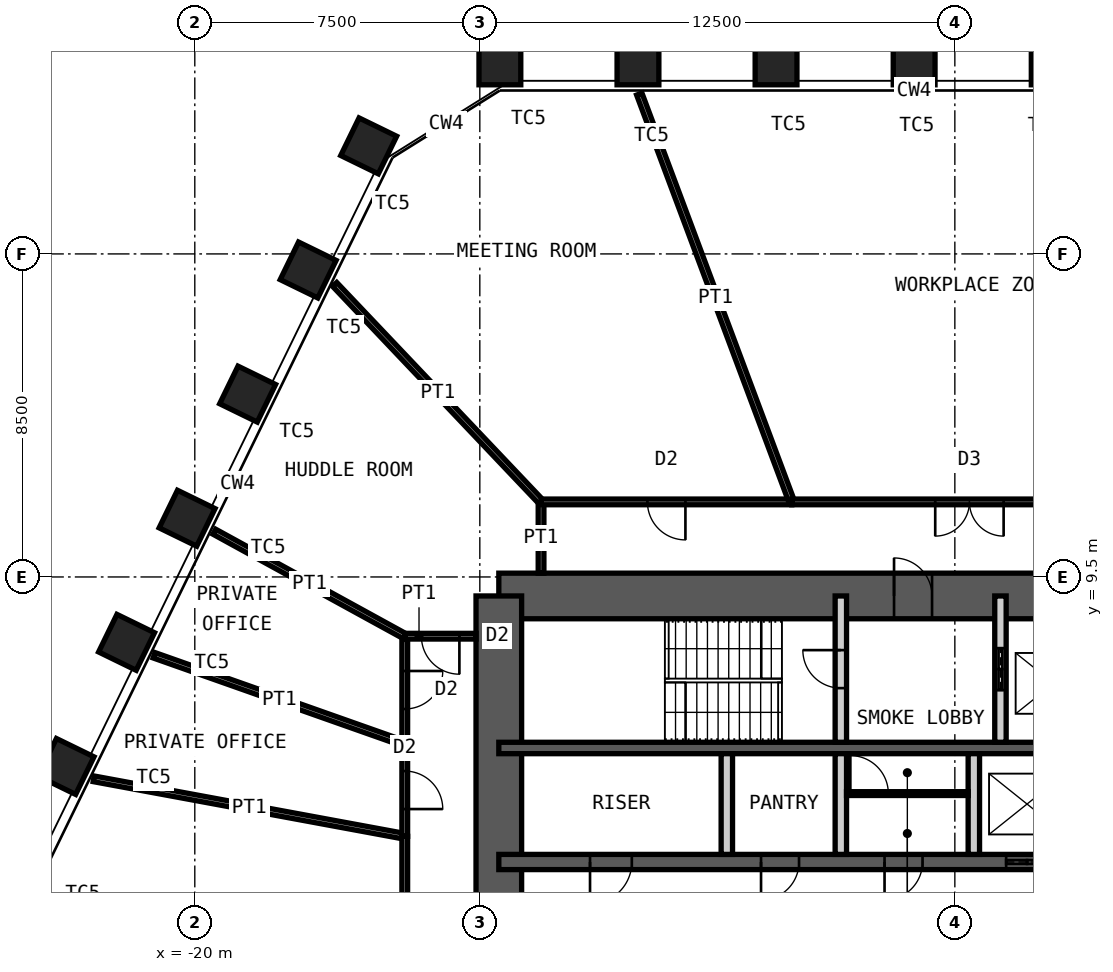
"""IFC4 building model, lengths in metres.
Left out: names, types, materials, properties, quantities, classifications, styles, units other than length and angle.
Written with IfcOpenShell. Run it as: python <this file> out.ifc"""

import sys

from ifc_helpers import new_model, si_unit, direction, frame, frame_2d, origin, origin_2d, place, context, subcontext, project, spatial, rectangle, hollow_rectangle, extrude, element, fill, save


model = new_model("IFC4")
c1 = context("Model", 3, precision=1e-05, world=origin(), true_north=direction((0.0, 1.0)))
c2 = subcontext(c1, "Body", "Model", "MODEL_VIEW")
j1 = project(units=[si_unit("LENGTHUNIT", "METRE"), si_unit("PLANEANGLEUNIT", "RADIAN")], contexts=[c1])
p1 = place(None, origin())
s1 = spatial("IfcSite", under=j1, at=p1, CompositionType="ELEMENT")
p2 = place(p1, origin())
s2 = spatial("IfcBuilding", under=s1, at=p2, CompositionType="ELEMENT")
p3 = place(p2, frame((0.0, 0.0, 193.0)))
s3 = spatial("IfcBuildingStorey", under=s2, at=p3, CompositionType="ELEMENT", Elevation=193.0)
for number, where, z_axis, x_axis in (
    (1, (-11.972, 23.0, 0.0), (0.0, 0.0, 1.0), (-1.0, 0.0, 0.0)),
    (2, (-8.338, 23.0, 0.0), (0.0, 0.0, 1.0), (-1.0, 0.0, 0.0)),
    (3, (-4.705, 23.0, 0.0), (0.0, 0.0, 1.0), (-1.0, 0.0, 0.0)),
    (4, (-1.071, 23.0, 0.0), (0.0, 0.0, 1.0), (-1.0, 0.0, 0.0)),
    (5, (2.562, 23.0, 0.0), (0.0, 0.0, 1.0), (-1.0, 0.0, 0.0)),
    (6, (-23.388, 4.514, 0.0), (0.0, 0.0, 1.0), (-0.438, -0.899, 0.0)),
    (7, (-21.795, 7.78, 0.0), (0.0, 0.0, 1.0), (-0.438, -0.899, 0.0)),
    (8, (-20.203, 11.045, 0.0), (0.0, 0.0, 1.0), (-0.438, -0.899, 0.0)),
    (9, (-18.61, 14.311, 0.0), (0.0, 0.0, 1.0), (-0.438, -0.899, 0.0)),
    (10, (-17.017, 17.577, 0.0), (0.0, 0.0, 1.0), (-0.438, -0.899, 0.0)),
    (11, (-15.424, 20.843, 0.0), (0.0, 0.0, 1.0), (-0.438, -0.899, 0.0)),
):
    element("IfcColumn", number, at=place(p3, frame(where, z_axis=z_axis, x_axis=x_axis)), inside=s3, PredefinedType="COLUMN", context=c2, shape_type="SweptSolid", body=[
        extrude(hollow_rectangle(XDim=1.1, YDim=1.1, WallThickness=0.07, at=origin_2d()), origin(), (0.0, 0.0, 1.0), 4.2),
    ])
p4 = place(p3, frame((-12.0, 9.0, 0.0), z_axis=(0.0, 0.0, 1.0), x_axis=(1.0, 0.0, 0.0)))
e12 = element("IfcWall", 12, at=p4, inside=s3, PredefinedType="SHEAR", context=c2, shape_type="SweptSolid", body=[
    extrude(rectangle(XDim=24.0, YDim=1.2, at=frame_2d((12.0, 0.0))), origin(), (0.0, 0.0, 1.0), 4.2),
])
p5 = place(p4, frame((10.4, 0.0, 0.0)))
e13 = element("IfcOpeningElement", 13, at=p5, cuts=e12, PredefinedType="OPENING", context=c2, shape_type="SweptSolid", body=[
    extrude(rectangle(XDim=1.0, YDim=2.1, at=frame_2d((0.5, 1.05))), frame((0.0, 0.61, 0.0), z_axis=(0.0, -1.0, 0.0), x_axis=(1.0, 0.0, 0.0)), (0.0, 0.0, 1.0), 1.22),
])
p6 = place(p4, frame((17.6, 0.0, 0.0)))
e14 = element("IfcOpeningElement", 14, at=p6, cuts=e12, PredefinedType="OPENING", context=c2, shape_type="SweptSolid", body=[
    extrude(rectangle(XDim=0.9, YDim=2.1, at=frame_2d((0.45, 1.05))), frame((0.0, 0.61, 0.0), z_axis=(0.0, -1.0, 0.0), x_axis=(1.0, 0.0, 0.0)), (0.0, 0.0, 1.0), 1.22),
])
p7 = place(p4, frame((21.9, 0.0, 0.0)))
e15 = element("IfcOpeningElement", 15, at=p7, cuts=e12, PredefinedType="OPENING", context=c2, shape_type="SweptSolid", body=[
    extrude(rectangle(XDim=0.9, YDim=2.1, at=frame_2d((0.45, 1.05))), frame((0.0, 0.61, 0.0), z_axis=(0.0, -1.0, 0.0), x_axis=(1.0, 0.0, 0.0)), (0.0, 0.0, 1.0), 1.22),
])
p8 = place(p3, frame((-12.0, -9.0, 0.0), z_axis=(0.0, 0.0, 1.0), x_axis=(0.0, 1.0, 0.0)))
e16 = element("IfcWall", 16, at=p8, inside=s3, PredefinedType="SHEAR", context=c2, shape_type="SweptSolid", body=[
    extrude(rectangle(XDim=18.0, YDim=1.2, at=frame_2d((9.0, 0.0))), origin(), (0.0, 0.0, 1.0), 4.2),
])
p9 = place(p8, frame((8.1, 0.0, 0.0)))
e17 = element("IfcOpeningElement", 17, at=p9, cuts=e16, PredefinedType="OPENING", context=c2, shape_type="SweptSolid", body=[
    extrude(rectangle(XDim=1.8, YDim=2.1, at=frame_2d((0.9, 1.05))), frame((0.0, 0.61, 0.0), z_axis=(0.0, -1.0, 0.0), x_axis=(1.0, 0.0, 0.0)), (0.0, 0.0, 1.0), 1.22),
])
p10 = place(p3, frame((-12.0, 5.0, 0.0), z_axis=(0.0, 0.0, 1.0), x_axis=(1.0, 0.0, 0.0)))
e18 = element("IfcWall", 18, at=p10, inside=s3, PredefinedType="SHEAR", context=c2, shape_type="SweptSolid", body=[
    extrude(rectangle(XDim=24.0, YDim=0.3, at=frame_2d((12.0, 0.0))), origin(), (0.0, 0.0, 1.0), 4.2),
])
p11 = place(p3, frame((-12.0, 2.0, 0.0), z_axis=(0.0, 0.0, 1.0), x_axis=(1.0, 0.0, 0.0)))
e19 = element("IfcWall", 19, at=p11, inside=s3, PredefinedType="SHEAR", context=c2, shape_type="SweptSolid", body=[
    extrude(rectangle(XDim=24.0, YDim=0.4, at=frame_2d((12.0, 0.0))), origin(), (0.0, 0.0, 1.0), 4.2),
])
p12 = place(p11, frame((2.4, 0.0, 0.0)))
e20 = element("IfcOpeningElement", 20, at=p12, cuts=e19, PredefinedType="OPENING", context=c2, shape_type="SweptSolid", body=[
    extrude(rectangle(XDim=1.1, YDim=2.1, at=frame_2d((0.55, 1.05))), frame((0.0, 0.21, 0.0), z_axis=(0.0, -1.0, 0.0), x_axis=(1.0, 0.0, 0.0)), (0.0, 0.0, 1.0), 0.42),
])
p13 = place(p11, frame((22.0, 0.0, 0.0)))
e21 = element("IfcOpeningElement", 21, at=p13, cuts=e19, PredefinedType="OPENING", context=c2, shape_type="SweptSolid", body=[
    extrude(rectangle(XDim=1.1, YDim=2.1, at=frame_2d((0.55, 1.05))), frame((0.0, 0.21, 0.0), z_axis=(0.0, -1.0, 0.0), x_axis=(1.0, 0.0, 0.0)), (0.0, 0.0, 1.0), 0.42),
])
p14 = place(p11, frame((10.15, 0.0, 0.0)))
e22 = element("IfcOpeningElement", 22, at=p14, cuts=e19, PredefinedType="OPENING", context=c2, shape_type="SweptSolid", body=[
    extrude(rectangle(XDim=1.0, YDim=2.1, at=frame_2d((0.5, 1.05))), frame((0.0, 0.21, 0.0), z_axis=(0.0, -1.0, 0.0), x_axis=(1.0, 0.0, 0.0)), (0.0, 0.0, 1.0), 0.42),
])
p15 = place(p11, frame((6.9, 0.0, 0.0)))
e23 = element("IfcOpeningElement", 23, at=p15, cuts=e19, PredefinedType="OPENING", context=c2, shape_type="SweptSolid", body=[
    extrude(rectangle(XDim=1.0, YDim=2.1, at=frame_2d((0.5, 1.05))), frame((0.0, 0.21, 0.0), z_axis=(0.0, -1.0, 0.0), x_axis=(1.0, 0.0, 0.0)), (0.0, 0.0, 1.0), 0.42),
])
p16 = place(p11, frame((13.35, 0.0, 0.0)))
e24 = element("IfcOpeningElement", 24, at=p16, cuts=e19, PredefinedType="OPENING", context=c2, shape_type="SweptSolid", body=[
    extrude(rectangle(XDim=1.1, YDim=2.4, at=frame_2d((0.55, 1.2))), frame((0.0, 0.21, 0.0), z_axis=(0.0, -1.0, 0.0), x_axis=(1.0, 0.0, 0.0)), (0.0, 0.0, 1.0), 0.42),
])
p17 = place(p11, frame((16.15, 0.0, 0.0)))
e25 = element("IfcOpeningElement", 25, at=p17, cuts=e19, PredefinedType="OPENING", context=c2, shape_type="SweptSolid", body=[
    extrude(rectangle(XDim=1.1, YDim=2.4, at=frame_2d((0.55, 1.2))), frame((0.0, 0.21, 0.0), z_axis=(0.0, -1.0, 0.0), x_axis=(1.0, 0.0, 0.0)), (0.0, 0.0, 1.0), 0.42),
])
p18 = place(p11, frame((18.95, 0.0, 0.0)))
e26 = element("IfcOpeningElement", 26, at=p18, cuts=e19, PredefinedType="OPENING", context=c2, shape_type="SweptSolid", body=[
    extrude(rectangle(XDim=1.1, YDim=2.4, at=frame_2d((0.55, 1.2))), frame((0.0, 0.21, 0.0), z_axis=(0.0, -1.0, 0.0), x_axis=(1.0, 0.0, 0.0)), (0.0, 0.0, 1.0), 0.42),
])
p19 = place(p3, frame((-3.0, 5.15, 0.0), z_axis=(0.0, 0.0, 1.0), x_axis=(0.0, 1.0, 0.0)))
e27 = element("IfcWall", 27, at=p19, inside=s3, PredefinedType="PARTITIONING", context=c2, shape_type="SweptSolid", body=[
    extrude(rectangle(XDim=3.85, YDim=0.3, at=frame_2d((1.925, 0.0))), origin(), (0.0, 0.0, 1.0), 3.98),
])
p20 = place(p19, frame((1.425, 0.0, 0.0)))
e28 = element("IfcOpeningElement", 28, at=p20, cuts=e27, PredefinedType="OPENING", context=c2, shape_type="SweptSolid", body=[
    extrude(rectangle(XDim=1.0, YDim=2.1, at=frame_2d((0.5, 1.05))), frame((0.0, 0.16, 0.0), z_axis=(0.0, -1.0, 0.0), x_axis=(1.0, 0.0, 0.0)), (0.0, 0.0, 1.0), 0.32),
])
p21 = place(p3, frame((1.2, 5.15, 0.0), z_axis=(0.0, 0.0, 1.0), x_axis=(0.0, 1.0, 0.0)))
e29 = element("IfcWall", 29, at=p21, inside=s3, PredefinedType="PARTITIONING", context=c2, shape_type="SweptSolid", body=[
    extrude(rectangle(XDim=3.85, YDim=0.3, at=frame_2d((1.925, 0.0))), origin(), (0.0, 0.0, 1.0), 3.98),
])
p22 = place(p21, frame((1.375, 0.0, 0.0)))
e30 = element("IfcOpeningElement", 30, at=p22, cuts=e29, PredefinedType="OPENING", context=c2, shape_type="SweptSolid", body=[
    extrude(rectangle(XDim=1.1, YDim=2.4, at=frame_2d((0.55, 1.2))), frame((0.0, 0.16, 0.0), z_axis=(0.0, -1.0, 0.0), x_axis=(1.0, 0.0, 0.0)), (0.0, 0.0, 1.0), 0.32),
])
for number, where, z_axis, x_axis in (
    (31, (-6.0, 2.2, 0.0), (0.0, 0.0, 1.0), (0.0, 1.0, 0.0)),
    (32, (-3.0, 2.2, 0.0), (0.0, 0.0, 1.0), (0.0, 1.0, 0.0)),
    (33, (0.5, 2.2, 0.0), (0.0, 0.0, 1.0), (0.0, 1.0, 0.0)),
):
    element("IfcWall", number, at=place(p3, frame(where, z_axis=z_axis, x_axis=x_axis)), inside=s3, PredefinedType="PARTITIONING", context=c2, shape_type="SweptSolid", body=[
        extrude(rectangle(XDim=2.65, YDim=0.3, at=frame_2d((1.325, 0.0))), origin(), (0.0, 0.0, 1.0), 3.98),
    ])
p23 = place(p3, frame((-2.85, 3.8, 0.0), z_axis=(0.0, 0.0, 1.0), x_axis=(1.0, 0.0, 0.0)))
e34 = element("IfcWall", 34, at=p23, inside=s3, PredefinedType="PARTITIONING", context=c2, shape_type="SweptSolid", body=[
    extrude(rectangle(XDim=3.2, YDim=0.1, at=frame_2d((1.6, 0.0))), origin(), (0.0, 0.0, 1.0), 3.98),
])
p24 = place(p23, frame((0.1, 0.0, 0.0)))
e35 = element("IfcOpeningElement", 35, at=p24, cuts=e34, PredefinedType="OPENING", context=c2, shape_type="SweptSolid", body=[
    extrude(rectangle(XDim=1.0, YDim=2.4, at=frame_2d((0.5, 1.2))), frame((0.0, 0.06, 0.0), z_axis=(0.0, -1.0, 0.0), x_axis=(1.0, 0.0, 0.0)), (0.0, 0.0, 1.0), 0.12),
])
p25 = place(p3, frame((-22.661, 4.189, 0.0), z_axis=(0.0, 0.0, 1.0), x_axis=(0.983345347199, -0.181746879316, 0.0)))
e36 = element("IfcWall", 36, at=p25, inside=s3, PredefinedType="PARTITIONING", context=c2, shape_type="SweptSolid", body=[
    extrude(rectangle(XDim=8.324, YDim=0.15, at=frame_2d((4.162, 0.0))), origin(), (0.0, 0.0, 1.0), 3.43),
])
p26 = place(p3, frame((-14.475, 2.676, 0.0), z_axis=(0.0, 0.0, 1.0), x_axis=(0.0, 1.0, 0.0)))
e37 = element("IfcWall", 37, at=p26, inside=s3, PredefinedType="PARTITIONING", context=c2, shape_type="SweptSolid", body=[
    extrude(rectangle(XDim=2.435, YDim=0.15, at=frame_2d((1.217, 0.0))), origin(), (0.0, 0.0, 1.0), 4.03),
])
p27 = place(p26, frame((0.717, 0.0, 0.0)))
e38 = element("IfcOpeningElement", 38, at=p27, cuts=e37, PredefinedType="OPENING", context=c2, shape_type="SweptSolid", body=[
    extrude(rectangle(XDim=1.0, YDim=2.4, at=frame_2d((0.5, 1.2))), frame((0.0, 0.085, 0.0), z_axis=(0.0, -1.0, 0.0), x_axis=(1.0, 0.0, 0.0)), (0.0, 0.0, 1.0), 0.17),
])
p28 = place(p3, frame((-21.072, 7.439, 0.0), z_axis=(0.0, 0.0, 1.0), x_axis=(0.94295553867, -0.332918686907, 0.0)))
e39 = element("IfcWall", 39, at=p28, inside=s3, PredefinedType="PARTITIONING", context=c2, shape_type="SweptSolid", body=[
    extrude(rectangle(XDim=6.996, YDim=0.15, at=frame_2d((3.498, 0.0))), origin(), (0.0, 0.0, 1.0), 3.43),
])
p29 = place(p3, frame((-14.475, 5.11, 0.0), z_axis=(0.0, 0.0, 1.0), x_axis=(0.0, 1.0, 0.0)))
e40 = element("IfcWall", 40, at=p29, inside=s3, PredefinedType="PARTITIONING", context=c2, shape_type="SweptSolid", body=[
    extrude(rectangle(XDim=2.831, YDim=0.15, at=frame_2d((1.416, 0.0))), origin(), (0.0, 0.0, 1.0), 4.03),
])
p30 = place(p29, frame((0.916, 0.0, 0.0)))
e41 = element("IfcOpeningElement", 41, at=p30, cuts=e40, PredefinedType="OPENING", context=c2, shape_type="SweptSolid", body=[
    extrude(rectangle(XDim=1.0, YDim=2.4, at=frame_2d((0.5, 1.2))), frame((0.0, 0.085, 0.0), z_axis=(0.0, -1.0, 0.0), x_axis=(1.0, 0.0, 0.0)), (0.0, 0.0, 1.0), 0.17),
])
p31 = place(p3, frame((-19.486, 10.69, 0.0), z_axis=(0.0, 0.0, 1.0), x_axis=(0.876724089264, -0.480993629172, 0.0)))
e42 = element("IfcWall", 42, at=p31, inside=s3, PredefinedType="PARTITIONING", context=c2, shape_type="SweptSolid", body=[
    extrude(rectangle(XDim=5.715, YDim=0.15, at=frame_2d((2.858, 0.0))), origin(), (0.0, 0.0, 1.0), 3.43),
])
p32 = place(p3, frame((-14.475, 7.941, 0.0), z_axis=(0.0, 0.0, 1.0), x_axis=(1.0, 0.0, 0.0)))
e43 = element("IfcWall", 43, at=p32, inside=s3, PredefinedType="PARTITIONING", context=c2, shape_type="SweptSolid", body=[
    extrude(rectangle(XDim=1.875, YDim=0.15, at=frame_2d((0.938, 0.0))), origin(), (0.0, 0.0, 1.0), 4.03),
])
p33 = place(p32, frame((0.438, 0.0, 0.0)))
e44 = element("IfcOpeningElement", 44, at=p33, cuts=e43, PredefinedType="OPENING", context=c2, shape_type="SweptSolid", body=[
    extrude(rectangle(XDim=1.0, YDim=2.4, at=frame_2d((0.5, 1.2))), frame((0.0, 0.085, 0.0), z_axis=(0.0, -1.0, 0.0), x_axis=(1.0, 0.0, 0.0)), (0.0, 0.0, 1.0), 0.17),
])
p34 = place(p3, frame((-10.889, 9.6, 0.0), z_axis=(0.0, 0.0, 1.0), x_axis=(0.0, 1.0, 0.0)))
e45 = element("IfcWall", 45, at=p34, inside=s3, PredefinedType="PARTITIONING", context=c2, shape_type="SweptSolid", body=[
    extrude(rectangle(XDim=1.875, YDim=0.15, at=frame_2d((0.938, 0.0))), origin(), (0.0, 0.0, 1.0), 4.03),
])
p35 = place(p3, frame((-16.319, 17.198, 0.0), z_axis=(0.0, 0.0, 1.0), x_axis=(0.688326413955, -0.725401094466, 0.0)))
e46 = element("IfcWall", 46, at=p35, inside=s3, PredefinedType="PARTITIONING", context=c2, shape_type="SweptSolid", body=[
    extrude(rectangle(XDim=7.889, YDim=0.15, at=frame_2d((3.944, 0.0))), origin(), (0.0, 0.0, 1.0), 4.03),
])
p36 = place(p3, frame((-10.889, 11.475, 0.0), z_axis=(0.0, 0.0, 1.0), x_axis=(1.0, 0.0, 0.0)))
e47 = element("IfcWall", 47, at=p36, inside=s3, PredefinedType="PARTITIONING", context=c2, shape_type="SweptSolid", body=[
    extrude(rectangle(XDim=6.598, YDim=0.15, at=frame_2d((3.299, 0.0))), origin(), (0.0, 0.0, 1.0), 4.03),
])
p37 = place(p36, frame((2.799, 0.0, 0.0)))
e48 = element("IfcOpeningElement", 48, at=p37, cuts=e47, PredefinedType="OPENING", context=c2, shape_type="SweptSolid", body=[
    extrude(rectangle(XDim=1.0, YDim=2.4, at=frame_2d((0.5, 1.2))), frame((0.0, 0.085, 0.0), z_axis=(0.0, -1.0, 0.0), x_axis=(1.0, 0.0, 0.0)), (0.0, 0.0, 1.0), 0.17),
])
p38 = place(p3, frame((-8.303, 22.206, 0.0), z_axis=(0.0, 0.0, 1.0), x_axis=(0.350242883069, -0.936658914899, 0.0)))
e49 = element("IfcWall", 49, at=p38, inside=s3, PredefinedType="PARTITIONING", context=c2, shape_type="SweptSolid", body=[
    extrude(rectangle(XDim=11.457, YDim=0.15, at=frame_2d((5.729, 0.0))), origin(), (0.0, 0.0, 1.0), 3.43),
])
p39 = place(p3, frame((-4.291, 11.475, 0.0), z_axis=(0.0, 0.0, 1.0), x_axis=(1.0, 0.0, 0.0)))
e50 = element("IfcWall", 50, at=p39, inside=s3, PredefinedType="PARTITIONING", context=c2, shape_type="SweptSolid", body=[
    extrude(rectangle(XDim=9.349, YDim=0.15, at=frame_2d((4.674, 0.0))), origin(), (0.0, 0.0, 1.0), 4.03),
])
p40 = place(p39, frame((3.774, 0.0, 0.0)))
e51 = element("IfcOpeningElement", 51, at=p40, cuts=e50, PredefinedType="OPENING", context=c2, shape_type="SweptSolid", body=[
    extrude(rectangle(XDim=1.8, YDim=2.4, at=frame_2d((0.9, 1.2))), frame((0.0, 0.085, 0.0), z_axis=(0.0, -1.0, 0.0), x_axis=(1.0, 0.0, 0.0)), (0.0, 0.0, 1.0), 0.17),
])
p41 = place(p3, frame((-14.475, -9.311, 0.0), z_axis=(0.0, 0.0, 1.0), x_axis=(0.0, 1.0, 0.0)))
e52 = element("IfcWall", 52, at=p41, inside=s3, PredefinedType="PARTITIONING", context=c2, shape_type="SweptSolid", body=[
    extrude(rectangle(XDim=11.987, YDim=0.15, at=frame_2d((5.993, 0.0))), origin(), (0.0, 0.0, 1.0), 4.03),
])
p42 = place(p41, frame((5.093, 0.0, 0.0)))
e53 = element("IfcOpeningElement", 53, at=p42, cuts=e52, PredefinedType="OPENING", context=c2, shape_type="SweptSolid", body=[
    extrude(rectangle(XDim=1.8, YDim=2.4, at=frame_2d((0.9, 1.2))), frame((0.0, 0.085, 0.0), z_axis=(0.0, -1.0, 0.0), x_axis=(1.0, 0.0, 0.0)), (0.0, 0.0, 1.0), 0.17),
])
p43 = place(p5, origin())
e54 = element("IfcDoor", 54, at=p43, inside=s3, OperationType="SINGLE_SWING_RIGHT", PredefinedType="DOOR", context=c2, shape_type="SweptSolid", body=[
    extrude(rectangle(XDim=1.0, YDim=2.1, at=frame_2d((0.5, 1.05))), frame((0.0, 0.025, 0.0), z_axis=(0.0, -1.0, 0.0), x_axis=(1.0, 0.0, 0.0)), (0.0, 0.0, 1.0), 0.05),
])
fill(e13, e54)
p44 = place(p20, origin())
e55 = element("IfcDoor", 55, at=p44, inside=s3, OperationType="SINGLE_SWING_LEFT", PredefinedType="DOOR", context=c2, shape_type="SweptSolid", body=[
    extrude(rectangle(XDim=1.0, YDim=2.1, at=frame_2d((0.5, 1.05))), frame((0.0, 0.025, 0.0), z_axis=(0.0, -1.0, 0.0), x_axis=(1.0, 0.0, 0.0)), (0.0, 0.0, 1.0), 0.05),
])
fill(e28, e55)
p45 = place(p12, origin())
e56 = element("IfcDoor", 56, at=p45, inside=s3, OperationType="SINGLE_SWING_LEFT", PredefinedType="DOOR", context=c2, shape_type="SweptSolid", body=[
    extrude(rectangle(XDim=1.1, YDim=2.1, at=frame_2d((0.55, 1.05))), frame((0.0, 0.025, 0.0), z_axis=(0.0, -1.0, 0.0), x_axis=(1.0, 0.0, 0.0)), (0.0, 0.0, 1.0), 0.05),
])
fill(e20, e56)
p46 = place(p14, origin())
e57 = element("IfcDoor", 57, at=p46, inside=s3, OperationType="SINGLE_SWING_LEFT", PredefinedType="DOOR", context=c2, shape_type="SweptSolid", body=[
    extrude(rectangle(XDim=1.0, YDim=2.1, at=frame_2d((0.5, 1.05))), frame((0.0, 0.025, 0.0), z_axis=(0.0, -1.0, 0.0), x_axis=(1.0, 0.0, 0.0)), (0.0, 0.0, 1.0), 0.05),
])
fill(e22, e57)
p47 = place(p22, origin())
e58 = element("IfcDoor", 58, at=p47, inside=s3, OperationType="DOUBLE_DOOR_SLIDING", PredefinedType="DOOR", context=c2, shape_type="SweptSolid", body=[
    extrude(rectangle(XDim=1.1, YDim=2.4, at=frame_2d((0.55, 1.2))), frame((0.0, 0.025, 0.0), z_axis=(0.0, -1.0, 0.0), x_axis=(1.0, 0.0, 0.0)), (0.0, 0.0, 1.0), 0.05),
])
fill(e30, e58)
p48 = place(p15, origin())
e59 = element("IfcDoor", 59, at=p48, inside=s3, OperationType="SINGLE_SWING_LEFT", PredefinedType="DOOR", context=c2, shape_type="SweptSolid", body=[
    extrude(rectangle(XDim=1.0, YDim=2.1, at=frame_2d((0.5, 1.05))), frame((0.0, 0.025, 0.0), z_axis=(0.0, -1.0, 0.0), x_axis=(1.0, 0.0, 0.0)), (0.0, 0.0, 1.0), 0.05),
])
fill(e23, e59)
p49 = place(p16, origin())
e60 = element("IfcDoor", 60, at=p49, inside=s3, OperationType="DOUBLE_DOOR_SLIDING", PredefinedType="DOOR", context=c2, shape_type="SweptSolid", body=[
    extrude(rectangle(XDim=1.1, YDim=2.4, at=frame_2d((0.55, 1.2))), frame((0.0, 0.025, 0.0), z_axis=(0.0, -1.0, 0.0), x_axis=(1.0, 0.0, 0.0)), (0.0, 0.0, 1.0), 0.05),
])
fill(e24, e60)
p50 = place(p24, origin())
e61 = element("IfcDoor", 61, at=p50, inside=s3, OperationType="SINGLE_SWING_RIGHT", PredefinedType="DOOR", context=c2, shape_type="SweptSolid", body=[
    extrude(rectangle(XDim=1.0, YDim=2.4, at=frame_2d((0.5, 1.2))), frame((0.0, 0.025, 0.0), z_axis=(0.0, -1.0, 0.0), x_axis=(1.0, 0.0, 0.0)), (0.0, 0.0, 1.0), 0.05),
])
fill(e35, e61)
p51 = place(p27, origin())
e62 = element("IfcDoor", 62, at=p51, inside=s3, OperationType="SINGLE_SWING_LEFT", PredefinedType="DOOR", context=c2, shape_type="SweptSolid", body=[
    extrude(rectangle(XDim=1.0, YDim=2.4, at=frame_2d((0.5, 1.2))), frame((0.0, 0.025, 0.0), z_axis=(0.0, -1.0, 0.0), x_axis=(1.0, 0.0, 0.0)), (0.0, 0.0, 1.0), 0.05),
])
fill(e38, e62)
p52 = place(p30, origin())
e63 = element("IfcDoor", 63, at=p52, inside=s3, OperationType="SINGLE_SWING_RIGHT", PredefinedType="DOOR", context=c2, shape_type="SweptSolid", body=[
    extrude(rectangle(XDim=1.0, YDim=2.4, at=frame_2d((0.5, 1.2))), frame((0.0, 0.025, 0.0), z_axis=(0.0, -1.0, 0.0), x_axis=(1.0, 0.0, 0.0)), (0.0, 0.0, 1.0), 0.05),
])
fill(e41, e63)
p53 = place(p33, origin())
e64 = element("IfcDoor", 64, at=p53, inside=s3, OperationType="SINGLE_SWING_RIGHT", PredefinedType="DOOR", context=c2, shape_type="SweptSolid", body=[
    extrude(rectangle(XDim=1.0, YDim=2.4, at=frame_2d((0.5, 1.2))), frame((0.0, 0.025, 0.0), z_axis=(0.0, -1.0, 0.0), x_axis=(1.0, 0.0, 0.0)), (0.0, 0.0, 1.0), 0.05),
])
fill(e44, e64)
p54 = place(p37, origin())
e65 = element("IfcDoor", 65, at=p54, inside=s3, OperationType="SINGLE_SWING_RIGHT", PredefinedType="DOOR", context=c2, shape_type="SweptSolid", body=[
    extrude(rectangle(XDim=1.0, YDim=2.4, at=frame_2d((0.5, 1.2))), frame((0.0, 0.025, 0.0), z_axis=(0.0, -1.0, 0.0), x_axis=(1.0, 0.0, 0.0)), (0.0, 0.0, 1.0), 0.05),
])
fill(e48, e65)
p55 = place(p40, origin())
e66 = element("IfcDoor", 66, at=p55, inside=s3, OperationType="DOUBLE_DOOR_DOUBLE_SWING", PredefinedType="DOOR", context=c2, shape_type="SweptSolid", body=[
    extrude(rectangle(XDim=1.8, YDim=2.4, at=frame_2d((0.9, 1.2))), frame((0.0, 0.025, 0.0), z_axis=(0.0, -1.0, 0.0), x_axis=(1.0, 0.0, 0.0)), (0.0, 0.0, 1.0), 0.05),
])
fill(e51, e66)
save(model, sys.argv[1])
